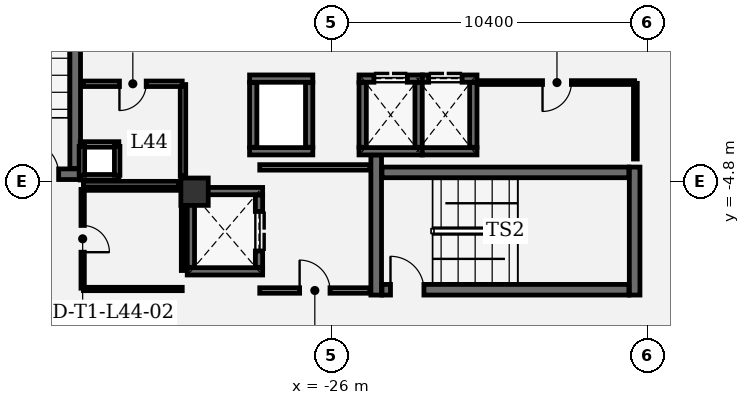
"""IFC4 building model, lengths in metres.
Left out: names, types, materials, properties, quantities, classifications, styles, units other than length and angle.
Written with IfcOpenShell. Run it as: python <this file> out.ifc"""

import sys

from ifc_helpers import new_model, si_unit, direction, frame, frame_2d, origin, origin_2d, place, context, subcontext, project, spatial, rectangle, extrude, element, fill, save


model = new_model("IFC4")
c1 = context("Model", 3, precision=1e-05, world=origin(), true_north=direction((0.0, 1.0)))
c2 = subcontext(c1, "Body", "Model", "MODEL_VIEW")
j1 = project(units=[si_unit("LENGTHUNIT", "METRE"), si_unit("PLANEANGLEUNIT", "RADIAN")], contexts=[c1])
p1 = place(None, origin())
s1 = spatial("IfcSite", under=j1, at=p1, CompositionType="ELEMENT")
p2 = place(p1, origin())
s2 = spatial("IfcBuilding", under=s1, at=p2, CompositionType="ELEMENT")
p3 = place(p2, frame((0.0, 0.0, 192.9)))
s3 = spatial("IfcBuildingStorey", under=s2, at=p3, CompositionType="ELEMENT", Elevation=192.9)
p4 = place(p3, frame((-30.5, -5.15, 0.0), z_axis=(0.0, 0.0, 1.0), x_axis=(1.0, 0.0, 0.0)))
e1 = element("IfcColumn", 1, at=p4, inside=s3, PredefinedType="COLUMN", context=c2, shape_type="SweptSolid", body=[
    extrude(rectangle(XDim=0.9, YDim=0.9, at=origin_2d()), origin(), (0.0, 0.0, 1.0), 4.05),
])
p5 = place(p3, frame((-24.525, -3.94, 0.0), z_axis=(0.0, 0.0, 1.0), x_axis=(0.0, -1.0, 0.0)))
e2 = element("IfcWall", 2, at=p5, inside=s3, PredefinedType="SHEAR", context=c2, shape_type="SweptSolid", body=[
    extrude(rectangle(XDim=4.61, YDim=0.35, at=frame_2d((2.305, 0.0))), origin(), (0.0, 0.0, 1.0), 3.78),
])
p6 = place(p3, frame((-16.025, -8.55, 0.0), z_axis=(0.0, 0.0, 1.0), x_axis=(0.0, 1.0, 0.0)))
e3 = element("IfcWall", 3, at=p6, inside=s3, PredefinedType="SHEAR", context=c2, shape_type="SweptSolid", body=[
    extrude(rectangle(XDim=4.21, YDim=0.35, at=frame_2d((2.105, 0.0))), origin(), (0.0, 0.0, 1.0), 3.78),
])
p7 = place(p3, frame((-24.335, -8.375, 0.0), z_axis=(0.0, 0.0, 1.0), x_axis=(1.0, 0.0, 0.0)))
e4 = element("IfcWall", 4, at=p7, inside=s3, PredefinedType="SHEAR", context=c2, shape_type="SweptSolid", body=[
    extrude(rectangle(XDim=8.12, YDim=0.35, at=frame_2d((4.06, 0.0))), origin(), (0.0, 0.0, 1.0), 3.78),
])
p8 = place(p7, frame((0.28, 0.0, 0.0)))
e5 = element("IfcOpeningElement", 5, at=p8, cuts=e4, PredefinedType="OPENING", context=c2, shape_type="SweptSolid", body=[
    extrude(rectangle(XDim=1.1, YDim=2.2, at=frame_2d((0.55, 1.1))), frame((0.0, 0.185, 0.0), z_axis=(0.0, -1.0, 0.0), x_axis=(1.0, 0.0, 0.0)), (0.0, 0.0, 1.0), 0.37),
])
p9 = place(p3, frame((-16.215, -4.515, 0.0), z_axis=(0.0, 0.0, 1.0), x_axis=(-1.0, 0.0, 0.0)))
e6 = element("IfcWall", 6, at=p9, inside=s3, PredefinedType="SHEAR", context=c2, shape_type="SweptSolid", body=[
    extrude(rectangle(XDim=8.12, YDim=0.35, at=frame_2d((4.06, 0.0))), origin(), (0.0, 0.0, 1.0), 3.78),
])
p10 = place(p3, frame((-38.46, -4.575, 0.0), z_axis=(0.0, 0.0, 1.0), x_axis=(1.0, 0.0, 0.0)))
e7 = element("IfcWall", 7, at=p10, inside=s3, PredefinedType="SHEAR", context=c2, shape_type="SweptSolid", body=[
    extrude(rectangle(XDim=4.21, YDim=0.35, at=frame_2d((2.105, 0.0))), origin(), (0.0, 0.0, 1.0), 3.78),
])
p11 = place(p10, frame((2.39, 0.0, 0.0)))
e8 = element("IfcOpeningElement", 8, at=p11, cuts=e7, PredefinedType="OPENING", context=c2, shape_type="SweptSolid", body=[
    extrude(rectangle(XDim=1.1, YDim=2.2, at=frame_2d((0.55, 1.1))), frame((0.0, 0.185, 0.0), z_axis=(0.0, -1.0, 0.0), x_axis=(1.0, 0.0, 0.0)), (0.0, 0.0, 1.0), 0.37),
])
p12 = place(p3, frame((-34.425, -4.385, 0.0), z_axis=(0.0, 0.0, 1.0), x_axis=(0.0, 1.0, 0.0)))
e9 = element("IfcWall", 9, at=p12, inside=s3, PredefinedType="SHEAR", context=c2, shape_type="SweptSolid", body=[
    extrude(rectangle(XDim=8.77, YDim=0.35, at=frame_2d((4.385, 0.0))), origin(), (0.0, 0.0, 1.0), 3.78),
])
for number, where, z_axis, x_axis in (
    (10, (-28.26, -7.77, 0.0), (0.0, 0.0, 1.0), (-1.0, 0.0, 0.0)),
    (11, (-30.74, -5.13, 0.0), (0.0, 0.0, 1.0), (1.0, 0.0, 0.0)),
):
    element("IfcWall", number, at=place(p3, frame(where, z_axis=z_axis, x_axis=x_axis)), inside=s3, PredefinedType="SHEAR", context=c2, shape_type="SweptSolid", body=[
        extrude(rectangle(XDim=2.48, YDim=0.24, at=frame_2d((1.24, 0.0))), origin(), (0.0, 0.0, 1.0), 3.78),
    ])
p13 = place(p3, frame((-30.62, -7.638, 0.0), z_axis=(0.0, 0.0, 1.0), x_axis=(0.0, 1.0, 0.0)))
e12 = element("IfcWall", 12, at=p13, inside=s3, PredefinedType="SHEAR", context=c2, shape_type="SweptSolid", body=[
    extrude(rectangle(XDim=2.376, YDim=0.24, at=frame_2d((1.188, 0.0))), origin(), (0.0, 0.0, 1.0), 3.78),
])
p14 = place(p3, frame((-28.38, -5.262, 0.0), z_axis=(0.0, 0.0, 1.0), x_axis=(0.0, -1.0, 0.0)))
e13 = element("IfcWall", 13, at=p14, inside=s3, PredefinedType="SHEAR", context=c2, shape_type="SweptSolid", body=[
    extrude(rectangle(XDim=2.376, YDim=0.24, at=frame_2d((1.188, 0.0))), origin(), (0.0, 0.0, 1.0), 3.78),
])
p15 = place(p14, frame((0.538, 0.0, 0.0)))
e14 = element("IfcOpeningElement", 14, at=p15, cuts=e13, PredefinedType="OPENING", context=c2, shape_type="SweptSolid", body=[
    extrude(rectangle(XDim=1.3, YDim=2.3, at=frame_2d((0.65, 1.15))), frame((0.0, 0.13, 0.0), z_axis=(0.0, -1.0, 0.0), x_axis=(1.0, 0.0, 0.0)), (0.0, 0.0, 1.0), 0.26),
])
for number, where, z_axis, x_axis in (
    (15, (-26.61, -3.82, 0.0), (0.0, 0.0, 1.0), (-1.0, 0.0, 0.0)),
    (16, (-28.69, -1.43, 0.0), (0.0, 0.0, 1.0), (1.0, 0.0, 0.0)),
):
    element("IfcWall", number, at=place(p3, frame(where, z_axis=z_axis, x_axis=x_axis)), inside=s3, PredefinedType="SHEAR", context=c2, shape_type="SweptSolid", body=[
        extrude(rectangle(XDim=2.08, YDim=0.24, at=frame_2d((1.04, 0.0))), origin(), (0.0, 0.0, 1.0), 3.78),
    ])
for number, where, z_axis, x_axis in (
    (17, (-28.57, -3.688, 0.0), (0.0, 0.0, 1.0), (0.0, 1.0, 0.0)),
    (18, (-26.73, -1.562, 0.0), (0.0, 0.0, 1.0), (0.0, -1.0, 0.0)),
):
    element("IfcWall", number, at=place(p3, frame(where, z_axis=z_axis, x_axis=x_axis)), inside=s3, PredefinedType="SHEAR", context=c2, shape_type="SweptSolid", body=[
        extrude(rectangle(XDim=2.126, YDim=0.24, at=frame_2d((1.063, 0.0))), origin(), (0.0, 0.0, 1.0), 3.78),
    ])
p16 = place(p3, frame((-23.01, -3.82, 0.0), z_axis=(0.0, 0.0, 1.0), x_axis=(-1.0, 0.0, 0.0)))
e19 = element("IfcWall", 19, at=p16, inside=s3, PredefinedType="SHEAR", context=c2, shape_type="SweptSolid", body=[
    extrude(rectangle(XDim=2.08, YDim=0.24, at=frame_2d((1.04, 0.0))), origin(), (0.0, 0.0, 1.0), 3.78),
])
p17 = place(p3, frame((-25.09, -1.43, 0.0), z_axis=(0.0, 0.0, 1.0), x_axis=(1.0, 0.0, 0.0)))
e20 = element("IfcWall", 20, at=p17, inside=s3, PredefinedType="SHEAR", context=c2, shape_type="SweptSolid", body=[
    extrude(rectangle(XDim=2.08, YDim=0.24, at=frame_2d((1.04, 0.0))), origin(), (0.0, 0.0, 1.0), 3.78),
])
p18 = place(p17, frame((0.49, 0.0, 0.0)))
e21 = element("IfcOpeningElement", 21, at=p18, cuts=e20, PredefinedType="OPENING", context=c2, shape_type="SweptSolid", body=[
    extrude(rectangle(XDim=1.1, YDim=2.2, at=frame_2d((0.55, 1.1))), frame((0.0, 0.13, 0.0), z_axis=(0.0, -1.0, 0.0), x_axis=(1.0, 0.0, 0.0)), (0.0, 0.0, 1.0), 0.26),
])
for number, where, z_axis, x_axis in (
    (22, (-24.97, -3.688, 0.0), (0.0, 0.0, 1.0), (0.0, 1.0, 0.0)),
    (23, (-23.13, -1.562, 0.0), (0.0, 0.0, 1.0), (0.0, -1.0, 0.0)),
):
    element("IfcWall", number, at=place(p3, frame(where, z_axis=z_axis, x_axis=x_axis)), inside=s3, PredefinedType="SHEAR", context=c2, shape_type="SweptSolid", body=[
        extrude(rectangle(XDim=2.126, YDim=0.24, at=frame_2d((1.063, 0.0))), origin(), (0.0, 0.0, 1.0), 3.78),
    ])
p19 = place(p3, frame((-21.21, -3.82, 0.0), z_axis=(0.0, 0.0, 1.0), x_axis=(-1.0, 0.0, 0.0)))
e24 = element("IfcWall", 24, at=p19, inside=s3, PredefinedType="SHEAR", context=c2, shape_type="SweptSolid", body=[
    extrude(rectangle(XDim=1.8, YDim=0.24, at=frame_2d((0.9, 0.0))), origin(), (0.0, 0.0, 1.0), 3.78),
])
p20 = place(p3, frame((-23.01, -1.43, 0.0), z_axis=(0.0, 0.0, 1.0), x_axis=(1.0, 0.0, 0.0)))
e25 = element("IfcWall", 25, at=p20, inside=s3, PredefinedType="SHEAR", context=c2, shape_type="SweptSolid", body=[
    extrude(rectangle(XDim=1.8, YDim=0.24, at=frame_2d((0.9, 0.0))), origin(), (0.0, 0.0, 1.0), 3.78),
])
p21 = place(p20, frame((0.21, 0.0, 0.0)))
e26 = element("IfcOpeningElement", 26, at=p21, cuts=e25, PredefinedType="OPENING", context=c2, shape_type="SweptSolid", body=[
    extrude(rectangle(XDim=1.1, YDim=2.2, at=frame_2d((0.55, 1.1))), frame((0.0, 0.13, 0.0), z_axis=(0.0, -1.0, 0.0), x_axis=(1.0, 0.0, 0.0)), (0.0, 0.0, 1.0), 0.26),
])
p22 = place(p3, frame((-21.33, -1.562, 0.0), z_axis=(0.0, 0.0, 1.0), x_axis=(0.0, -1.0, 0.0)))
e27 = element("IfcWall", 27, at=p22, inside=s3, PredefinedType="SHEAR", context=c2, shape_type="SweptSolid", body=[
    extrude(rectangle(XDim=2.126, YDim=0.24, at=frame_2d((1.063, 0.0))), origin(), (0.0, 0.0, 1.0), 3.78),
])
for number, where, z_axis, x_axis in (
    (28, (-32.99, -4.675, 0.0), (0.0, 0.0, 1.0), (-1.0, 0.0, 0.0)),
    (29, (-34.26, -3.595, 0.0), (0.0, 0.0, 1.0), (1.0, 0.0, 0.0)),
):
    element("IfcWall", number, at=place(p3, frame(where, z_axis=z_axis, x_axis=x_axis)), inside=s3, PredefinedType="PARTITIONING", context=c2, shape_type="SweptSolid", body=[
        extrude(rectangle(XDim=1.27, YDim=0.18, at=frame_2d((0.635, 0.0))), origin(), (0.0, 0.0, 1.0), 3.78),
    ])
for number, where, z_axis, x_axis in (
    (30, (-34.205, -4.61, 0.0), (0.0, 0.0, 1.0), (0.0, 1.0, 0.0)),
    (31, (-33.045, -3.66, 0.0), (0.0, 0.0, 1.0), (0.0, -1.0, 0.0)),
):
    element("IfcWall", number, at=place(p3, frame(where, z_axis=z_axis, x_axis=x_axis)), inside=s3, PredefinedType="PARTITIONING", context=c2, shape_type="SweptSolid", body=[
        extrude(rectangle(XDim=0.95, YDim=0.18, at=frame_2d((0.475, 0.0))), origin(), (0.0, 0.0, 1.0), 3.78),
    ])
p23 = place(p3, frame((-28.355, -8.4, 0.0), z_axis=(0.0, 0.0, 1.0), x_axis=(1.0, 0.0, 0.0)))
e32 = element("IfcWall", 32, at=p23, inside=s3, PredefinedType="PARTITIONING", context=c2, shape_type="SweptSolid", body=[
    extrude(rectangle(XDim=3.622, YDim=0.18, at=frame_2d((1.811, 0.0))), origin(), (0.0, 0.0, 1.0), 3.78),
])
p24 = place(p23, frame((1.311, 0.0, 0.0)))
e33 = element("IfcOpeningElement", 33, at=p24, cuts=e32, PredefinedType="OPENING", context=c2, shape_type="SweptSolid", body=[
    extrude(rectangle(XDim=1.0, YDim=2.15, at=frame_2d((0.5, 1.075))), frame((0.0, 0.1, 0.0), z_axis=(0.0, -1.0, 0.0), x_axis=(1.0, 0.0, 0.0)), (0.0, 0.0, 1.0), 0.2),
])
p25 = place(p3, frame((-24.733, -4.35, 0.0), z_axis=(0.0, 0.0, 1.0), x_axis=(-1.0, 0.0, 0.0)))
e34 = element("IfcWall", 34, at=p25, inside=s3, PredefinedType="PARTITIONING", context=c2, shape_type="SweptSolid", body=[
    extrude(rectangle(XDim=3.622, YDim=0.18, at=frame_2d((1.811, 0.0))), origin(), (0.0, 0.0, 1.0), 3.78),
])
p26 = place(p3, frame((-34.155, -8.35, 0.0), z_axis=(0.0, 0.0, 1.0), x_axis=(1.0, 0.0, 0.0)))
e35 = element("IfcWall", 35, at=p26, inside=s3, PredefinedType="PARTITIONING", context=c2, shape_type="SweptSolid", body=[
    extrude(rectangle(XDim=3.25, YDim=0.11, at=frame_2d((1.625, 0.0))), origin(), (0.0, 0.0, 1.0), 3.344),
])
p27 = place(p3, frame((-30.88, -7.743, 0.0), z_axis=(0.0, 0.0, 1.0), x_axis=(0.0, 1.0, 0.0)))
e36 = element("IfcWall", 36, at=p27, inside=s3, PredefinedType="PARTITIONING", context=c2, shape_type="SweptSolid", body=[
    extrude(rectangle(XDim=2.078, YDim=0.11, at=frame_2d((1.039, 0.0))), origin(), (0.0, 0.0, 1.0), 3.78),
])
p28 = place(p3, frame((-31.015, -5.05, 0.0), z_axis=(0.0, 0.0, 1.0), x_axis=(-1.0, 0.0, 0.0)))
e37 = element("IfcWall", 37, at=p28, inside=s3, PredefinedType="PARTITIONING", context=c2, shape_type="SweptSolid", body=[
    extrude(rectangle(XDim=3.14, YDim=0.11, at=frame_2d((1.57, 0.0))), origin(), (0.0, 0.0, 1.0), 3.78),
])
p29 = place(p3, frame((-34.18, -5.075, 0.0), z_axis=(0.0, 0.0, 1.0), x_axis=(0.0, -1.0, 0.0)))
e38 = element("IfcWall", 38, at=p29, inside=s3, PredefinedType="PARTITIONING", context=c2, shape_type="SweptSolid", body=[
    extrude(rectangle(XDim=3.25, YDim=0.11, at=frame_2d((1.625, 0.0))), origin(), (0.0, 0.0, 1.0), 3.78),
])
p30 = place(p29, frame((1.185, 0.0, 0.0)))
e39 = element("IfcOpeningElement", 39, at=p30, cuts=e38, PredefinedType="OPENING", context=c2, shape_type="SweptSolid", body=[
    extrude(rectangle(XDim=0.88, YDim=2.1, at=frame_2d((0.44, 1.05))), frame((0.0, 0.065, 0.0), z_axis=(0.0, -1.0, 0.0), x_axis=(1.0, 0.0, 0.0)), (0.0, 0.0, 1.0), 0.13),
])
p31 = place(p3, frame((-16.0, -4.075, 0.0), z_axis=(0.0, 0.0, 1.0), x_axis=(0.0, 1.0, 0.0)))
e40 = element("IfcWall", 40, at=p31, inside=s3, PredefinedType="PARTITIONING", context=c2, shape_type="SweptSolid", body=[
    extrude(rectangle(XDim=2.49, YDim=0.125, at=frame_2d((1.245, 0.0))), origin(), (0.0, 0.0, 1.0), 3.78),
])
p32 = place(p3, frame((-16.025, -1.56, 0.0), z_axis=(0.0, 0.0, 1.0), x_axis=(-1.0, 0.0, 0.0)))
e41 = element("IfcWall", 41, at=p32, inside=s3, PredefinedType="PARTITIONING", context=c2, shape_type="SweptSolid", body=[
    extrude(rectangle(XDim=5.109, YDim=0.125, at=frame_2d((2.554, 0.0))), origin(), (0.0, 0.0, 1.0), 3.78),
])
p33 = place(p32, frame((2.079, 0.0, 0.0)))
e42 = element("IfcOpeningElement", 42, at=p33, cuts=e41, PredefinedType="OPENING", context=c2, shape_type="SweptSolid", body=[
    extrude(rectangle(XDim=0.95, YDim=2.15, at=frame_2d((0.475, 1.075))), frame((0.0, 0.073, 0.0), z_axis=(0.0, -1.0, 0.0), x_axis=(1.0, 0.0, 0.0)), (0.0, 0.0, 1.0), 0.145),
])
p34 = place(p3, frame((-34.155, -4.9, 0.0), z_axis=(0.0, 0.0, 1.0), x_axis=(1.0, 0.0, 0.0)))
e43 = element("IfcWall", 43, at=p34, inside=s3, PredefinedType="PARTITIONING", context=c2, shape_type="SweptSolid", body=[
    extrude(rectangle(XDim=3.14, YDim=0.18, at=frame_2d((1.57, 0.0))), origin(), (0.0, 0.0, 1.0), 3.78),
])
p35 = place(p3, frame((-30.88, -4.635, 0.0), z_axis=(0.0, 0.0, 1.0), x_axis=(0.0, 1.0, 0.0)))
e44 = element("IfcWall", 44, at=p35, inside=s3, PredefinedType="PARTITIONING", context=c2, shape_type="SweptSolid", body=[
    extrude(rectangle(XDim=3.01, YDim=0.18, at=frame_2d((1.505, 0.0))), origin(), (0.0, 0.0, 1.0), 3.78),
])
p36 = place(p3, frame((-30.905, -1.6, 0.0), z_axis=(0.0, 0.0, 1.0), x_axis=(-1.0, 0.0, 0.0)))
e45 = element("IfcWall", 45, at=p36, inside=s3, PredefinedType="PARTITIONING", context=c2, shape_type="SweptSolid", body=[
    extrude(rectangle(XDim=3.25, YDim=0.18, at=frame_2d((1.625, 0.0))), origin(), (0.0, 0.0, 1.0), 3.78),
])
p37 = place(p36, frame((1.185, 0.0, 0.0)))
e46 = element("IfcOpeningElement", 46, at=p37, cuts=e45, PredefinedType="OPENING", context=c2, shape_type="SweptSolid", body=[
    extrude(rectangle(XDim=0.88, YDim=2.1, at=frame_2d((0.44, 1.05))), frame((0.0, 0.1, 0.0), z_axis=(0.0, -1.0, 0.0), x_axis=(1.0, 0.0, 0.0)), (0.0, 0.0, 1.0), 0.2),
])
p38 = place(p8, origin())
e47 = element("IfcDoor", 47, at=p38, inside=s3, OperationType="SINGLE_SWING_LEFT", PredefinedType="DOOR", context=c2, shape_type="SweptSolid", body=[
    extrude(rectangle(XDim=1.1, YDim=2.2, at=frame_2d((0.55, 1.1))), frame((0.0, 0.025, 0.0), z_axis=(0.0, -1.0, 0.0), x_axis=(1.0, 0.0, 0.0)), (0.0, 0.0, 1.0), 0.05),
])
fill(e5, e47)
p39 = place(p11, origin())
e48 = element("IfcDoor", 48, at=p39, inside=s3, OperationType="SINGLE_SWING_LEFT", PredefinedType="DOOR", context=c2, shape_type="SweptSolid", body=[
    extrude(rectangle(XDim=1.1, YDim=2.2, at=frame_2d((0.55, 1.1))), frame((0.0, 0.025, 0.0), z_axis=(0.0, -1.0, 0.0), x_axis=(1.0, 0.0, 0.0)), (0.0, 0.0, 1.0), 0.05),
])
fill(e8, e48)
p40 = place(p15, origin())
e49 = element("IfcDoor", 49, at=p40, inside=s3, OperationType="DOUBLE_DOOR_SLIDING", PredefinedType="DOOR", context=c2, shape_type="SweptSolid", body=[
    extrude(rectangle(XDim=1.3, YDim=2.3, at=frame_2d((0.65, 1.15))), frame((0.0, 0.025, 0.0), z_axis=(0.0, -1.0, 0.0), x_axis=(1.0, 0.0, 0.0)), (0.0, 0.0, 1.0), 0.05),
])
fill(e14, e49)
p41 = place(p18, origin())
e50 = element("IfcDoor", 50, at=p41, inside=s3, OperationType="DOUBLE_DOOR_SLIDING", PredefinedType="DOOR", context=c2, shape_type="SweptSolid", body=[
    extrude(rectangle(XDim=1.1, YDim=2.2, at=frame_2d((0.55, 1.1))), frame((0.0, 0.025, 0.0), z_axis=(0.0, -1.0, 0.0), x_axis=(1.0, 0.0, 0.0)), (0.0, 0.0, 1.0), 0.05),
])
fill(e21, e50)
p42 = place(p21, origin())
e51 = element("IfcDoor", 51, at=p42, inside=s3, OperationType="DOUBLE_DOOR_SLIDING", PredefinedType="DOOR", context=c2, shape_type="SweptSolid", body=[
    extrude(rectangle(XDim=1.1, YDim=2.2, at=frame_2d((0.55, 1.1))), frame((0.0, 0.025, 0.0), z_axis=(0.0, -1.0, 0.0), x_axis=(1.0, 0.0, 0.0)), (0.0, 0.0, 1.0), 0.05),
])
fill(e26, e51)
p43 = place(p30, origin())
e52 = element("IfcDoor", 52, at=p43, inside=s3, OperationType="SINGLE_SWING_RIGHT", PredefinedType="DOOR", context=c2, shape_type="SweptSolid", body=[
    extrude(rectangle(XDim=0.88, YDim=2.1, at=frame_2d((0.44, 1.05))), frame((0.0, 0.025, 0.0), z_axis=(0.0, -1.0, 0.0), x_axis=(1.0, 0.0, 0.0)), (0.0, 0.0, 1.0), 0.05),
])
fill(e39, e52)
p44 = place(p33, origin())
e53 = element("IfcDoor", 53, at=p44, inside=s3, OperationType="SINGLE_SWING_RIGHT", PredefinedType="DOOR", context=c2, shape_type="SweptSolid", body=[
    extrude(rectangle(XDim=0.95, YDim=2.15, at=frame_2d((0.475, 1.075))), frame((0.0, 0.025, 0.0), z_axis=(0.0, -1.0, 0.0), x_axis=(1.0, 0.0, 0.0)), (0.0, 0.0, 1.0), 0.05),
])
fill(e42, e53)
p45 = place(p37, origin())
e54 = element("IfcDoor", 54, at=p45, inside=s3, OperationType="SINGLE_SWING_RIGHT", PredefinedType="DOOR", context=c2, shape_type="SweptSolid", body=[
    extrude(rectangle(XDim=0.88, YDim=2.1, at=frame_2d((0.44, 1.05))), frame((0.0, 0.025, 0.0), z_axis=(0.0, -1.0, 0.0), x_axis=(1.0, 0.0, 0.0)), (0.0, 0.0, 1.0), 0.05),
])
fill(e46, e54)
p46 = place(p24, origin())
e55 = element("IfcDoor", 55, at=p46, inside=s3, OperationType="SINGLE_SWING_LEFT", PredefinedType="DOOR", context=c2, shape_type="SweptSolid", body=[
    extrude(rectangle(XDim=1.0, YDim=2.15, at=frame_2d((0.5, 1.075))), frame((0.0, 0.025, 0.0), z_axis=(0.0, -1.0, 0.0), x_axis=(1.0, 0.0, 0.0)), (0.0, 0.0, 1.0), 0.05),
])
fill(e33, e55)
save(model, sys.argv[1])
